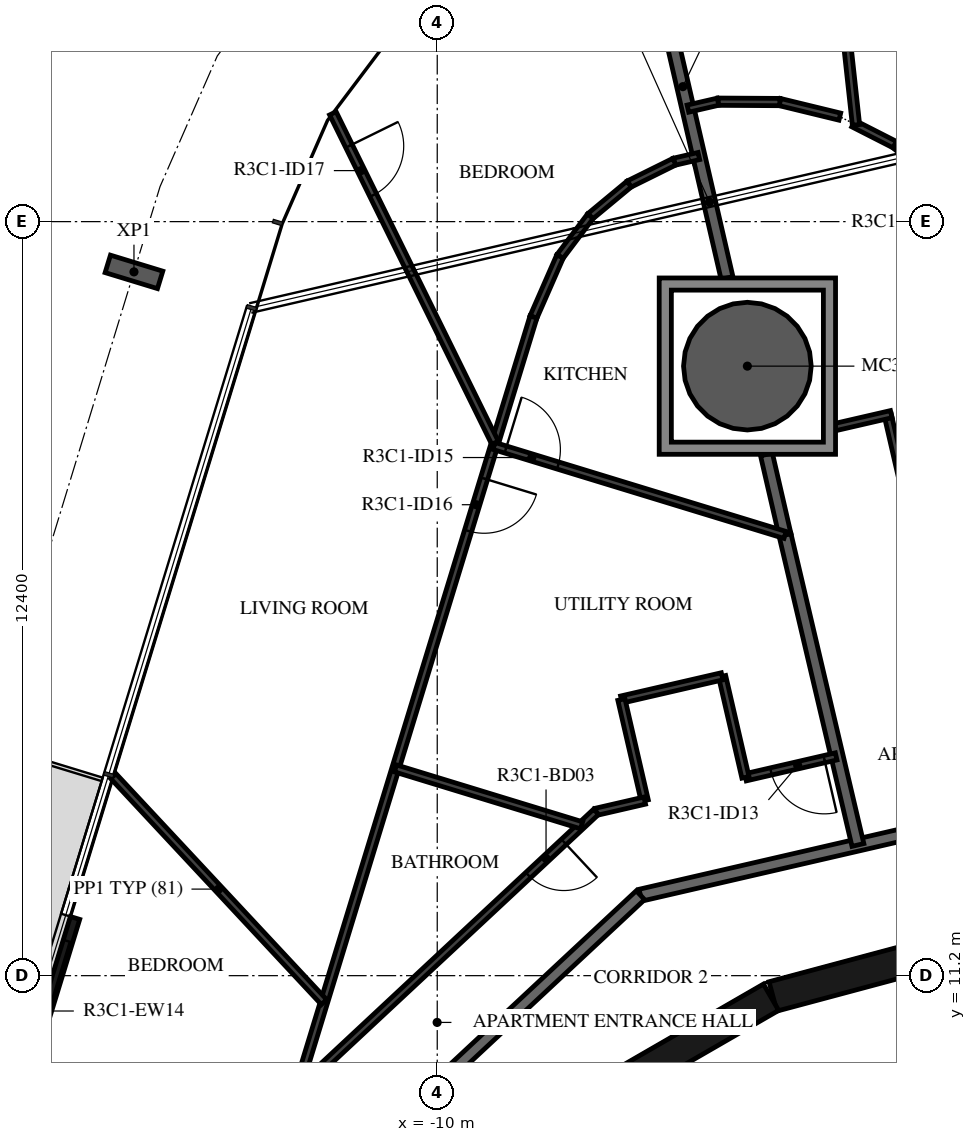
"""IFC4 building model, lengths in metres.
Left out: names, types, materials, properties, quantities, classifications, styles, units other than length and angle.
Written with IfcOpenShell. Run it as: python <this file> out.ifc"""

import sys

from ifc_helpers import new_model, si_unit, direction, frame, frame_2d, origin, origin_2d, place, context, subcontext, project, spatial, polyline, rectangle, hollow_circle, i_section, outline, extrude, element, fill, save


model = new_model("IFC4")
c1 = context("Model", 3, precision=1e-05, world=origin(), true_north=direction((0.0, 1.0)))
c2 = subcontext(c1, "Body", "Model", "MODEL_VIEW")
j1 = project(units=[si_unit("LENGTHUNIT", "METRE"), si_unit("PLANEANGLEUNIT", "RADIAN")], contexts=[c1])
p1 = place(None, origin())
s1 = spatial("IfcSite", under=j1, at=p1, CompositionType="ELEMENT")
p2 = place(p1, origin())
s2 = spatial("IfcBuilding", under=s1, at=p2, CompositionType="ELEMENT")
p3 = place(p2, frame((0.0, 0.0, 137.9)))
s3 = spatial("IfcBuildingStorey", under=s2, at=p3, CompositionType="ELEMENT", Elevation=137.9)
p4 = place(p3, frame((-4.9, 21.223, -0.38), z_axis=(0.0, 0.0, 1.0), x_axis=(1.0, 0.0, 0.0)))
e1 = element("IfcColumn", 1, at=p4, inside=s3, PredefinedType="COLUMN", context=c2, shape_type="SweptSolid", body=[
    extrude(hollow_circle(Radius=1.05, WallThickness=0.05, at=origin_2d()), origin(), (0.0, 0.0, 1.0), 3.5),
])
p5 = place(p3, frame((-14.987, 22.773, -0.38), z_axis=(0.0, 0.0, 1.0), x_axis=(0.29237190653, 0.956304694264, 0.0)))
e2 = element("IfcColumn", 2, at=p5, inside=s3, PredefinedType="COLUMN", context=c2, shape_type="SweptSolid", body=[
    extrude(i_section(OverallWidth=0.3, OverallDepth=0.9, WebThickness=0.019, FlangeThickness=0.035, FilletRadius=0.03, at=origin_2d()), origin(), (0.0, 0.0, 1.0), 3.5),
])
p6 = place(p3, frame((-15.956, 12.149, 0.0), z_axis=(0.0, 0.0, 1.0), x_axis=(-0.29243949851, -0.956284026695, 0.0)))
e3 = element("IfcWall", 3, at=p6, inside=s3, PredefinedType="STANDARD", context=c2, shape_type="SweptSolid", body=[
    extrude(rectangle(XDim=3.2, YDim=0.16, at=frame_2d((1.6, 0.0))), origin(), (0.0, 0.0, 1.0), 3.12),
])
p7 = place(p6, frame((0.4, 0.0, 0.0)))
e4 = element("IfcOpeningElement", 4, at=p7, cuts=e3, PredefinedType="OPENING", context=c2, shape_type="SweptSolid", body=[
    extrude(rectangle(XDim=2.4, YDim=2.4, at=frame_2d((1.2, 1.2))), frame((0.0, 0.09, 0.0), z_axis=(0.0, -1.0, 0.0), x_axis=(1.0, 0.0, 0.0)), (0.0, 0.0, 1.0), 0.18),
])
for number, where, z_axis, x_axis in (
    (5, (-1.55, 11.643, 0.0), (0.0, 0.0, 1.0), (-0.966, -0.259, 0.0)),
    (6, (-4.51, 10.845, 0.0), (0.0, 0.0, 1.0), (-0.866, -0.5, 0.0)),
):
    element("IfcWall", number, at=place(p3, frame(where, z_axis=z_axis, x_axis=x_axis)), inside=s3, PredefinedType="SHEAR", context=c2, shape_type="SweptSolid", body=[
        extrude(rectangle(XDim=3.033, YDim=0.5, at=frame_2d((1.516, 0.0))), origin(), (0.0, 0.0, 1.0), 3.12),
    ])
p8 = place(p3, frame((0.495, 14.175, 0.0), z_axis=(0.0, 0.0, 1.0), x_axis=(-0.974376622151, -0.224922649383, 0.0)))
e7 = element("IfcWall", 7, at=p8, inside=s3, PredefinedType="STANDARD", context=c2, shape_type="SweptSolid", body=[
    extrude(rectangle(XDim=7.342, YDim=0.2, at=frame_2d((3.671, 0.0))), origin(), (0.0, 0.0, 1.0), 3.12),
])
p9 = place(p3, frame((-6.659, 12.523, 0.0), z_axis=(0.0, 0.0, 1.0), x_axis=(-0.731350455479, -0.682001841105, 0.0)))
e8 = element("IfcWall", 8, at=p9, inside=s3, PredefinedType="STANDARD", context=c2, shape_type="SweptSolid", body=[
    extrude(rectangle(XDim=7.342, YDim=0.2, at=frame_2d((3.671, 0.0))), origin(), (0.0, 0.0, 1.0), 3.12),
])
p10 = place(p9, frame((4.2, 0.0, 0.0)))
e9 = element("IfcOpeningElement", 9, at=p10, cuts=e8, PredefinedType="OPENING", context=c2, shape_type="SweptSolid", body=[
    extrude(rectangle(XDim=1.0, YDim=2.1, at=frame_2d((0.5, 1.05))), frame((0.0, 0.11, 0.0), z_axis=(0.0, -1.0, 0.0), x_axis=(1.0, 0.0, 0.0)), (0.0, 0.0, 1.0), 0.22),
])
p11 = place(p3, frame((-4.281, 18.448, 0.0), z_axis=(0.0, 0.0, 1.0), x_axis=(0.228867856942, -0.973457499873, 0.0)))
e10 = element("IfcWall", 10, at=p11, inside=s3, PredefinedType="STANDARD", context=c2, shape_type="SweptSolid", body=[
    extrude(rectangle(XDim=5.238, YDim=0.2, at=frame_2d((2.619, 0.0))), origin(), (0.0, 0.0, 1.0), 3.12),
])
p12 = place(p3, frame((-4.586, 19.771, 0.0), z_axis=(0.0, 0.0, 1.0), x_axis=(0.224898895484, -0.974382105136, 0.0)))
e11 = element("IfcWall", 11, at=p12, inside=s3, PredefinedType="STANDARD", context=c2, shape_type="SweptSolid", body=[
    extrude(rectangle(XDim=1.358, YDim=0.2, at=frame_2d((0.679, 0.0))), origin(), (0.0, 0.0, 1.0), 3.12),
])
p13 = place(p3, frame((-6.687, 28.966, 0.0), z_axis=(0.0, 0.0, 1.0), x_axis=(0.224945100086, -0.974371439415, 0.0)))
e12 = element("IfcWall", 12, at=p13, inside=s3, PredefinedType="STANDARD", context=c2, shape_type="SweptSolid", body=[
    extrude(rectangle(XDim=6.458, YDim=0.2, at=frame_2d((3.229, 0.0))), origin(), (0.0, 0.0, 1.0), 3.12),
])
p14 = place(p3, frame((-1.404, 15.276, 0.0), z_axis=(0.0, 0.0, 1.0), x_axis=(-0.224947305813, 0.974370930194, 0.0)))
e13 = element("IfcWall", 13, at=p14, inside=s3, PredefinedType="PARTITIONING", context=c2, shape_type="SweptSolid", body=[
    extrude(rectangle(XDim=5.28, YDim=0.12, at=frame_2d((2.64, 0.0))), origin(), (0.0, 0.0, 1.0), 3.12),
])
p15 = place(p3, frame((-2.533, 20.434, 0.0), z_axis=(0.0, 0.0, 1.0), x_axis=(-0.974387124574, -0.224877147491, 0.0)))
e14 = element("IfcWall", 14, at=p15, inside=s3, PredefinedType="PARTITIONING", context=c2, shape_type="SweptSolid", body=[
    extrude(rectangle(XDim=1.011, YDim=0.12, at=frame_2d((0.505, 0.0))), origin(), (0.0, 0.0, 1.0), 3.12),
])
p16 = place(p3, frame((-3.156, 25.212, 0.0), z_axis=(0.0, 0.0, 1.0), x_axis=(0.890954246936, -0.454093085025, 0.0)))
e15 = element("IfcWall", 15, at=p16, inside=s3, PredefinedType="PARTITIONING", context=c2, shape_type="SweptSolid", body=[
    extrude(rectangle(XDim=0.765, YDim=0.12, at=frame_2d((0.383, 0.0))), origin(), (0.0, 0.0, 1.0), 3.12),
])
p17 = place(p3, frame((-2.474, 24.865, 0.0), z_axis=(0.0, 0.0, 1.0), x_axis=(0.762351487461, -0.647163201647, 0.0)))
e16 = element("IfcWall", 16, at=p17, inside=s3, PredefinedType="PARTITIONING", context=c2, shape_type="SweptSolid", body=[
    extrude(rectangle(XDim=1.227, YDim=0.12, at=frame_2d((0.614, 0.0))), origin(), (0.0, 0.0, 1.0), 3.12),
])
p18 = place(p3, frame((-3.538, 29.07, 0.0), z_axis=(0.0, 0.0, 1.0), x_axis=(0.1087420482, -0.994070001033, 0.0)))
e17 = element("IfcWall", 17, at=p18, inside=s3, PredefinedType="PARTITIONING", context=c2, shape_type="SweptSolid", body=[
    extrude(rectangle(XDim=3.902, YDim=0.12, at=frame_2d((1.951, 0.0))), origin(), (0.0, 0.0, 1.0), 3.12),
])
p19 = place(p18, frame((0.2, 0.0, 0.0)))
e18 = element("IfcOpeningElement", 18, at=p19, cuts=e17, PredefinedType="OPENING", context=c2, shape_type="SweptSolid", body=[
    extrude(rectangle(XDim=0.9, YDim=2.1, at=frame_2d((0.45, 1.05))), frame((0.0, 0.07, 0.0), z_axis=(0.0, -1.0, 0.0), x_axis=(1.0, 0.0, 0.0)), (0.0, 0.0, 1.0), 0.14),
])
p20 = place(p3, frame((-3.379, 25.326, 0.0), z_axis=(0.0, 0.0, 1.0), x_axis=(-0.971704876381, 0.236198292157, 0.0)))
e19 = element("IfcWall", 19, at=p20, inside=s3, PredefinedType="PARTITIONING", context=c2, shape_type="SweptSolid", body=[
    extrude(rectangle(XDim=1.016, YDim=0.12, at=frame_2d((0.508, 0.0))), origin(), (0.0, 0.0, 1.0), 3.12),
])
p21 = place(p3, frame((-4.367, 25.566, 0.0), z_axis=(0.0, 0.0, 1.0), x_axis=(-0.999983366401, 0.005767748328, 0.0)))
e20 = element("IfcWall", 20, at=p21, inside=s3, PredefinedType="PARTITIONING", context=c2, shape_type="SweptSolid", body=[
    extrude(rectangle(XDim=1.016, YDim=0.12, at=frame_2d((0.508, 0.0))), origin(), (0.0, 0.0, 1.0), 3.12),
])
p22 = place(p3, frame((-5.383, 25.572, 0.0), z_axis=(0.0, 0.0, 1.0), x_axis=(-0.974366885246, -0.224964825997, 0.0)))
e21 = element("IfcWall", 21, at=p22, inside=s3, PredefinedType="PARTITIONING", context=c2, shape_type="SweptSolid", body=[
    extrude(rectangle(XDim=0.508, YDim=0.12, at=frame_2d((0.254, 0.0))), origin(), (0.0, 0.0, 1.0), 3.12),
])
p23 = place(p3, frame((-3.44, 14.806, 0.0), z_axis=(0.0, 0.0, 1.0), x_axis=(-0.974356244071, -0.225010910046, 0.0)))
e22 = element("IfcWall", 22, at=p23, inside=s3, PredefinedType="PARTITIONING", context=c2, shape_type="SweptSolid", body=[
    extrude(rectangle(XDim=1.531, YDim=0.12, at=frame_2d((0.766, 0.0))), origin(), (0.0, 0.0, 1.0), 3.12),
])
p24 = place(p23, frame((0.2, 0.0, 0.0)))
e23 = element("IfcOpeningElement", 23, at=p24, cuts=e22, PredefinedType="OPENING", context=c2, shape_type="SweptSolid", body=[
    extrude(rectangle(XDim=0.9, YDim=2.1, at=frame_2d((0.45, 1.05))), frame((0.0, 0.07, 0.0), z_axis=(0.0, -1.0, 0.0), x_axis=(1.0, 0.0, 0.0)), (0.0, 0.0, 1.0), 0.14),
])
p25 = place(p3, frame((-4.931, 14.461, 0.0), z_axis=(0.0, 0.0, 1.0), x_axis=(-0.224911785629, 0.974379129849, 0.0)))
e24 = element("IfcWall", 24, at=p25, inside=s3, PredefinedType="PARTITIONING", context=c2, shape_type="SweptSolid", body=[
    extrude(rectangle(XDim=1.705, YDim=0.12, at=frame_2d((0.853, 0.0))), origin(), (0.0, 0.0, 1.0), 3.12),
])
p26 = place(p3, frame((-5.315, 16.123, 0.0), z_axis=(0.0, 0.0, 1.0), x_axis=(-0.974352456598, -0.225027310168, 0.0)))
e25 = element("IfcWall", 25, at=p26, inside=s3, PredefinedType="PARTITIONING", context=c2, shape_type="SweptSolid", body=[
    extrude(rectangle(XDim=1.7, YDim=0.12, at=frame_2d((0.85, 0.0))), origin(), (0.0, 0.0, 1.0), 3.12),
])
p27 = place(p3, frame((-6.971, 15.74, 0.0), z_axis=(0.0, 0.0, 1.0), x_axis=(0.224943164347, -0.974371886301, 0.0)))
e26 = element("IfcWall", 26, at=p27, inside=s3, PredefinedType="PARTITIONING", context=c2, shape_type="SweptSolid", body=[
    extrude(rectangle(XDim=1.705, YDim=0.12, at=frame_2d((0.853, 0.0))), origin(), (0.0, 0.0, 1.0), 3.12),
])
p28 = place(p3, frame((-6.588, 14.079, 0.0), z_axis=(0.0, 0.0, 1.0), x_axis=(-0.974391195695, -0.224859506699, 0.0)))
e27 = element("IfcWall", 27, at=p28, inside=s3, PredefinedType="PARTITIONING", context=c2, shape_type="SweptSolid", body=[
    extrude(rectangle(XDim=0.821, YDim=0.12, at=frame_2d((0.41, 0.0))), origin(), (0.0, 0.0, 1.0), 3.12),
])
p29 = place(p3, frame((-7.388, 13.894, 0.0), z_axis=(0.0, 0.0, 1.0), x_axis=(-0.731357186721, -0.681994622729, 0.0)))
e28 = element("IfcWall", 28, at=p29, inside=s3, PredefinedType="PARTITIONING", context=c2, shape_type="SweptSolid", body=[
    extrude(rectangle(XDim=8.146, YDim=0.12, at=frame_2d((4.073, 0.0))), origin(), (0.0, 0.0, 1.0), 3.12),
])
p30 = place(p29, frame((0.725, 0.0, 0.0)))
e29 = element("IfcOpeningElement", 29, at=p30, cuts=e28, PredefinedType="OPENING", context=c2, shape_type="SweptSolid", body=[
    extrude(rectangle(XDim=0.8, YDim=2.1, at=frame_2d((0.4, 1.05))), frame((0.0, 0.07, 0.0), z_axis=(0.0, -1.0, 0.0), x_axis=(1.0, 0.0, 0.0)), (0.0, 0.0, 1.0), 0.14),
])
p31 = place(p29, frame((6.927, 0.0, 0.0)))
e30 = element("IfcOpeningElement", 30, at=p31, cuts=e28, PredefinedType="OPENING", context=c2, shape_type="SweptSolid", body=[
    extrude(rectangle(XDim=0.9, YDim=2.1, at=frame_2d((0.45, 1.05))), frame((0.0, 0.07, 0.0), z_axis=(0.0, -1.0, 0.0), x_axis=(1.0, 0.0, 0.0)), (0.0, 0.0, 1.0), 0.14),
])
p32 = place(p3, frame((-5.698, 24.679, 0.0), z_axis=(0.0, 0.0, 1.0), x_axis=(-0.974222160042, -0.225590742017, 0.0)))
e31 = element("IfcWall", 31, at=p32, inside=s3, PredefinedType="PARTITIONING", context=c2, shape_type="SweptSolid", body=[
    extrude(rectangle(XDim=0.415, YDim=0.12, at=frame_2d((0.207, 0.0))), origin(), (0.0, 0.0, 1.0), 3.12),
])
p33 = place(p3, frame((-6.101, 24.585, 0.0), z_axis=(0.0, 0.0, 1.0), x_axis=(-0.896362871824, -0.443321104862, 0.0)))
e32 = element("IfcWall", 32, at=p33, inside=s3, PredefinedType="PARTITIONING", context=c2, shape_type="SweptSolid", body=[
    extrude(rectangle(XDim=0.829, YDim=0.12, at=frame_2d((0.415, 0.0))), origin(), (0.0, 0.0, 1.0), 3.12),
])
p34 = place(p3, frame((-6.844, 24.218, 0.0), z_axis=(0.0, 0.0, 1.0), x_axis=(-0.769715611418, -0.63838693403, 0.0)))
e33 = element("IfcWall", 33, at=p34, inside=s3, PredefinedType="PARTITIONING", context=c2, shape_type="SweptSolid", body=[
    extrude(rectangle(XDim=0.829, YDim=0.12, at=frame_2d((0.415, 0.0))), origin(), (0.0, 0.0, 1.0), 3.12),
])
p35 = place(p3, frame((-7.482, 23.688, 0.0), z_axis=(0.0, 0.0, 1.0), x_axis=(-0.601836624867, -0.798619231529, 0.0)))
e34 = element("IfcWall", 34, at=p35, inside=s3, PredefinedType="PARTITIONING", context=c2, shape_type="SweptSolid", body=[
    extrude(rectangle(XDim=0.829, YDim=0.12, at=frame_2d((0.415, 0.0))), origin(), (0.0, 0.0, 1.0), 3.12),
])
p36 = place(p3, frame((-7.981, 23.027, 0.0), z_axis=(0.0, 0.0, 1.0), x_axis=(-0.401360750198, -0.915920055573, 0.0)))
e35 = element("IfcWall", 35, at=p36, inside=s3, PredefinedType="PARTITIONING", context=c2, shape_type="SweptSolid", body=[
    extrude(rectangle(XDim=1.087, YDim=0.12, at=frame_2d((0.543, 0.0))), origin(), (0.0, 0.0, 1.0), 3.12),
])
p37 = place(p3, frame((-8.417, 22.031, 0.0), z_axis=(0.0, 0.0, 1.0), x_axis=(-0.292371891841, -0.956304698755, 0.0)))
e36 = element("IfcWall", 36, at=p37, inside=s3, PredefinedType="PARTITIONING", context=c2, shape_type="SweptSolid", body=[
    extrude(rectangle(XDim=13.306, YDim=0.12, at=frame_2d((6.653, 0.0))), origin(), (0.0, 0.0, 1.0), 3.12),
])
p38 = place(p37, frame((2.777, 0.0, 0.0)))
e37 = element("IfcOpeningElement", 37, at=p38, cuts=e36, PredefinedType="OPENING", context=c2, shape_type="SweptSolid", body=[
    extrude(rectangle(XDim=0.9, YDim=2.1, at=frame_2d((0.45, 1.05))), frame((0.0, 0.07, 0.0), z_axis=(0.0, -1.0, 0.0), x_axis=(1.0, 0.0, 0.0)), (0.0, 0.0, 1.0), 0.14),
])
p39 = place(p3, frame((-9.066, 19.91, 0.0), z_axis=(0.0, 0.0, 1.0), x_axis=(0.956313309797, -0.292343724928, 0.0)))
e38 = element("IfcWall", 38, at=p39, inside=s3, PredefinedType="PARTITIONING", context=c2, shape_type="SweptSolid", body=[
    extrude(rectangle(XDim=5.004, YDim=0.12, at=frame_2d((2.502, 0.0))), origin(), (0.0, 0.0, 1.0), 3.12),
])
p40 = place(p39, frame((0.2, 0.0, 0.0)))
e39 = element("IfcOpeningElement", 39, at=p40, cuts=e38, PredefinedType="OPENING", context=c2, shape_type="SweptSolid", body=[
    extrude(rectangle(XDim=0.9, YDim=2.1, at=frame_2d((0.45, 1.05))), frame((0.0, 0.07, 0.0), z_axis=(0.0, -1.0, 0.0), x_axis=(1.0, 0.0, 0.0)), (0.0, 0.0, 1.0), 0.14),
])
p41 = place(p3, frame((-11.716, 25.381, 0.0), z_axis=(0.0, 0.0, 1.0), x_axis=(0.441576881221, -0.897223415862, 0.0)))
e40 = element("IfcWall", 40, at=p41, inside=s3, PredefinedType="PARTITIONING", context=c2, shape_type="SweptSolid", body=[
    extrude(rectangle(XDim=6.039, YDim=0.12, at=frame_2d((3.019, 0.0))), origin(), (0.0, 0.0, 1.0), 3.12),
])
p42 = place(p41, frame((0.6, 0.0, 0.0)))
e41 = element("IfcOpeningElement", 41, at=p42, cuts=e40, PredefinedType="OPENING", context=c2, shape_type="SweptSolid", body=[
    extrude(rectangle(XDim=0.9, YDim=2.1, at=frame_2d((0.45, 1.05))), frame((0.0, 0.07, 0.0), z_axis=(0.0, -1.0, 0.0), x_axis=(1.0, 0.0, 0.0)), (0.0, 0.0, 1.0), 0.14),
])
p43 = place(p3, frame((-10.687, 14.608, 0.0), z_axis=(0.0, 0.0, 1.0), x_axis=(0.956295309419, -0.292402601189, 0.0)))
e42 = element("IfcWall", 42, at=p43, inside=s3, PredefinedType="PARTITIONING", context=c2, shape_type="SweptSolid", body=[
    extrude(rectangle(XDim=3.201, YDim=0.12, at=frame_2d((1.601, 0.0))), origin(), (0.0, 0.0, 1.0), 3.12),
])
p44 = place(p3, frame((-15.327, 14.481, 0.0), z_axis=(0.0, 0.0, 1.0), x_axis=(0.68197575128, -0.731374783997, 0.0)))
e43 = element("IfcWall", 43, at=p44, inside=s3, PredefinedType="PARTITIONING", context=c2, shape_type="SweptSolid", body=[
    extrude(rectangle(XDim=5.081, YDim=0.12, at=frame_2d((2.54, 0.0))), origin(), (0.0, 0.0, 1.0), 3.12),
])
p45 = place(p3, origin())
e44 = element("IfcWall", 44, at=p45, inside=s3, PredefinedType="STANDARD", context=c2, shape_type="SweptSolid", body=[
    extrude(outline(polyline([(-3.45, 22.674), (-3.45, 19.773), (-6.35, 19.773), (-6.35, 22.674), (-3.45, 22.674)]), holes=[polyline([(-6.15, 19.973), (-3.65, 19.973), (-3.65, 22.473), (-6.15, 22.473), (-6.15, 19.973)])]), origin(), (0.0, 0.0, 1.0), 3.12),
])
p46 = place(p7, origin())
e45 = element("IfcDoor", 45, at=p46, inside=s3, OperationType="DOUBLE_DOOR_SLIDING", PredefinedType="DOOR", context=c2, shape_type="SweptSolid", body=[
    extrude(rectangle(XDim=2.4, YDim=2.4, at=frame_2d((1.2, 1.2))), frame((0.0, 0.025, 0.0), z_axis=(0.0, -1.0, 0.0), x_axis=(1.0, 0.0, 0.0)), (0.0, 0.0, 1.0), 0.05),
])
fill(e4, e45)
p47 = place(p24, origin())
e46 = element("IfcDoor", 46, at=p47, inside=s3, OperationType="SINGLE_SWING_LEFT", PredefinedType="DOOR", context=c2, shape_type="SweptSolid", body=[
    extrude(rectangle(XDim=0.9, YDim=2.1, at=frame_2d((0.45, 1.05))), frame((0.0, 0.025, 0.0), z_axis=(0.0, -1.0, 0.0), x_axis=(1.0, 0.0, 0.0)), (0.0, 0.0, 1.0), 0.05),
])
fill(e23, e46)
p48 = place(p30, origin())
e47 = element("IfcDoor", 47, at=p48, inside=s3, OperationType="SINGLE_SWING_LEFT", PredefinedType="DOOR", context=c2, shape_type="SweptSolid", body=[
    extrude(rectangle(XDim=0.8, YDim=2.1, at=frame_2d((0.4, 1.05))), frame((0.0, 0.025, 0.0), z_axis=(0.0, -1.0, 0.0), x_axis=(1.0, 0.0, 0.0)), (0.0, 0.0, 1.0), 0.05),
])
fill(e29, e47)
p49 = place(p40, origin())
e48 = element("IfcDoor", 48, at=p49, inside=s3, OperationType="SINGLE_SWING_LEFT", PredefinedType="DOOR", context=c2, shape_type="SweptSolid", body=[
    extrude(rectangle(XDim=0.9, YDim=2.1, at=frame_2d((0.45, 1.05))), frame((0.0, 0.025, 0.0), z_axis=(0.0, -1.0, 0.0), x_axis=(1.0, 0.0, 0.0)), (0.0, 0.0, 1.0), 0.05),
])
fill(e39, e48)
p50 = place(p38, origin())
e49 = element("IfcDoor", 49, at=p50, inside=s3, OperationType="SINGLE_SWING_LEFT", PredefinedType="DOOR", context=c2, shape_type="SweptSolid", body=[
    extrude(rectangle(XDim=0.9, YDim=2.1, at=frame_2d((0.45, 1.05))), frame((0.0, 0.025, 0.0), z_axis=(0.0, -1.0, 0.0), x_axis=(1.0, 0.0, 0.0)), (0.0, 0.0, 1.0), 0.05),
])
fill(e37, e49)
p51 = place(p42, origin())
e50 = element("IfcDoor", 50, at=p51, inside=s3, OperationType="SINGLE_SWING_LEFT", PredefinedType="DOOR", context=c2, shape_type="SweptSolid", body=[
    extrude(rectangle(XDim=0.9, YDim=2.1, at=frame_2d((0.45, 1.05))), frame((0.0, 0.025, 0.0), z_axis=(0.0, -1.0, 0.0), x_axis=(1.0, 0.0, 0.0)), (0.0, 0.0, 1.0), 0.05),
])
fill(e41, e50)
save(model, sys.argv[1])
